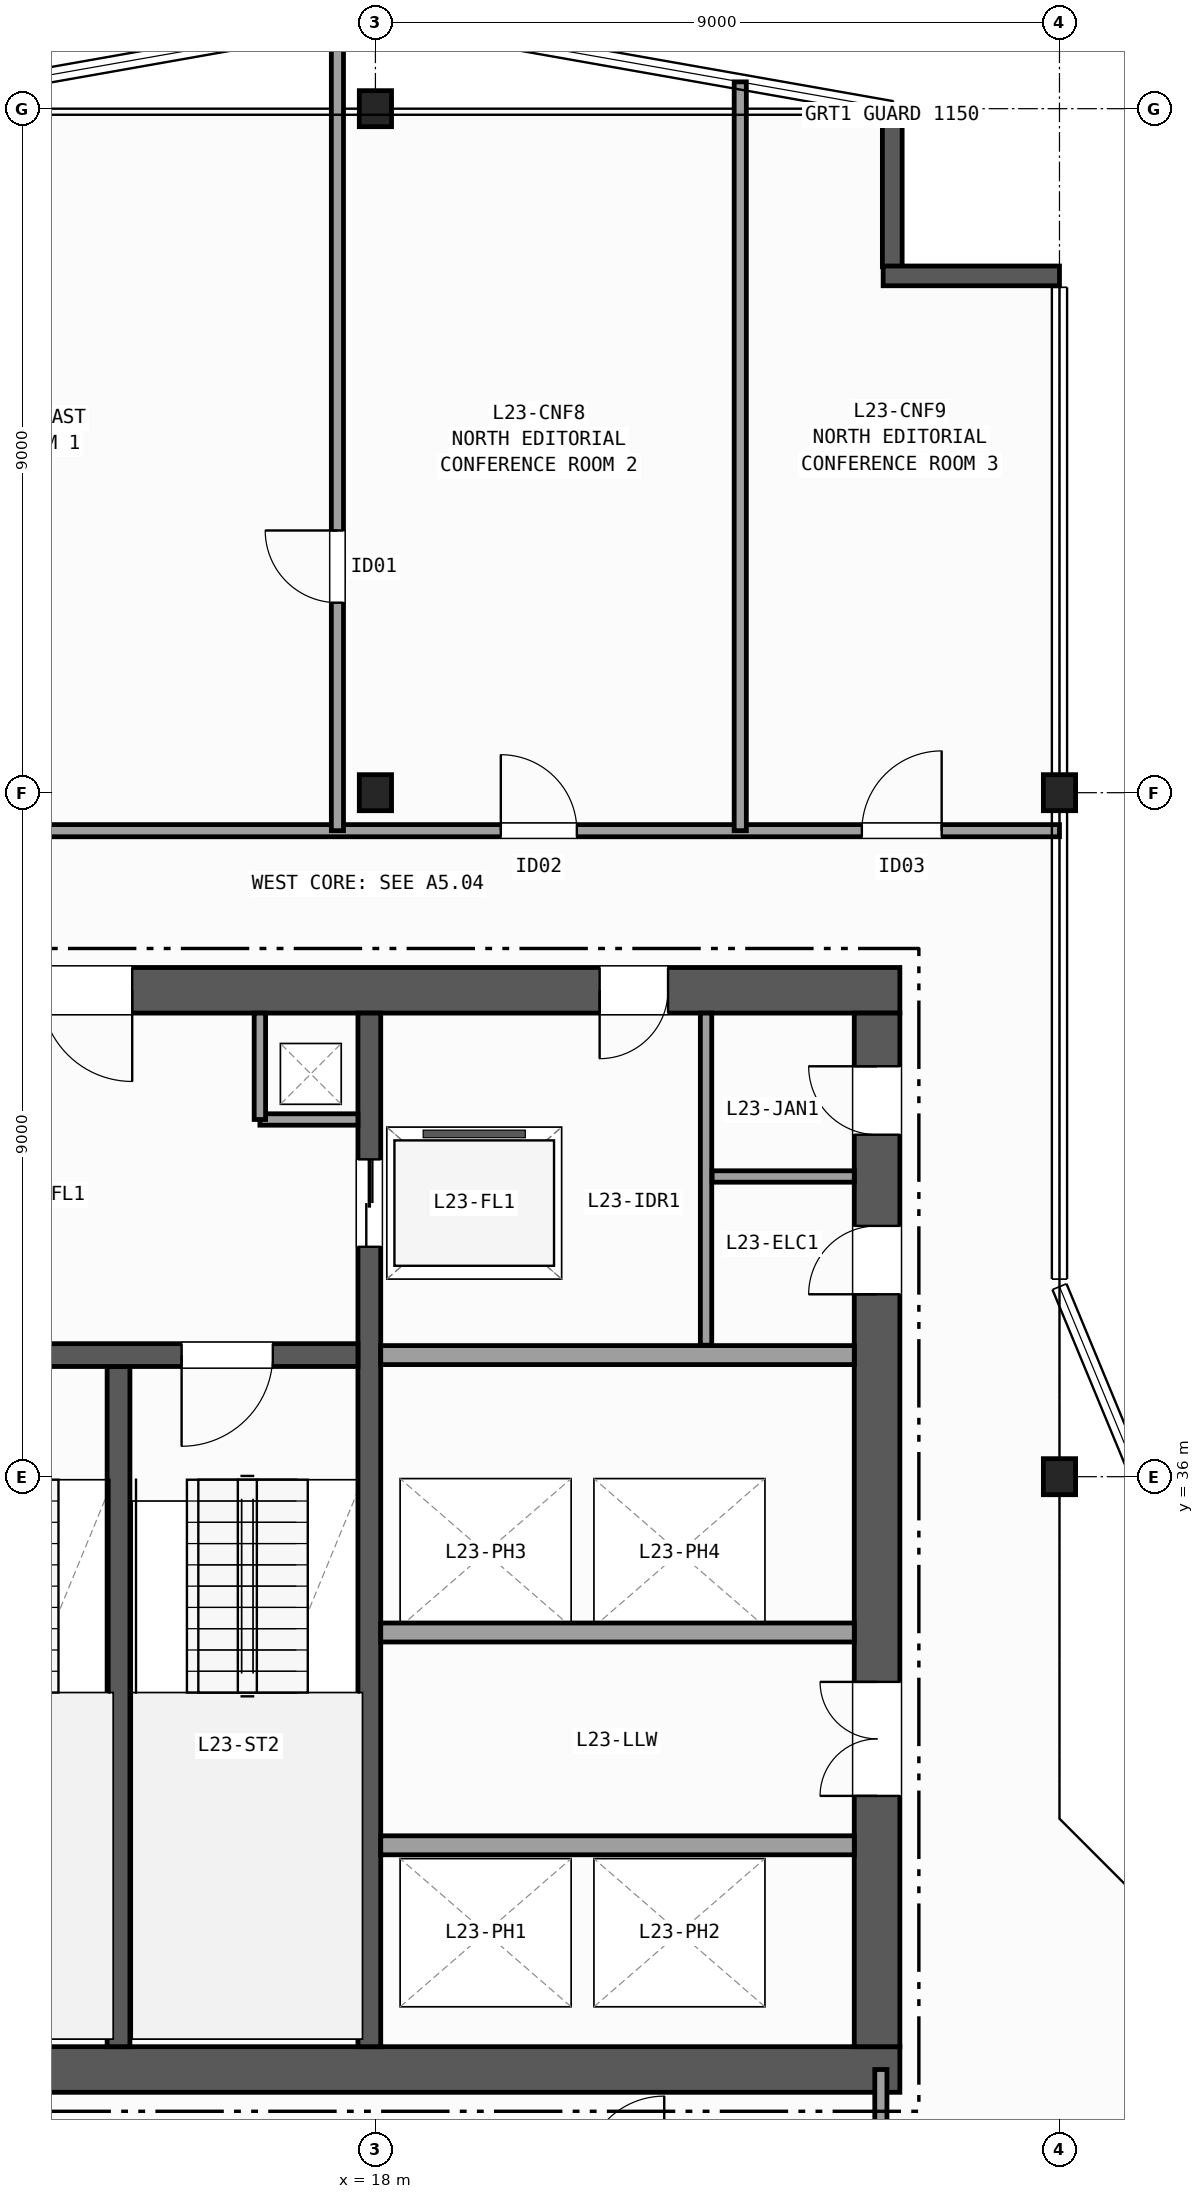
"""IFC4 building model, lengths in metres.
Left out: names, types, materials, properties, quantities, classifications, styles, units other than length and angle.
Written with IfcOpenShell. Run it as: python <this file> out.ifc"""

import sys

from ifc_helpers import new_model, si_unit, direction, frame, frame_2d, origin, origin_2d, place, context, subcontext, project, spatial, rectangle, i_section, extrude, element, fill, save


model = new_model("IFC4")
c1 = context("Model", 3, precision=1e-05, world=origin(), true_north=direction((0.0, 1.0)))
c2 = subcontext(c1, "Body", "Model", "MODEL_VIEW")
j1 = project(units=[si_unit("LENGTHUNIT", "METRE"), si_unit("PLANEANGLEUNIT", "RADIAN")], contexts=[c1])
p1 = place(None, origin())
s1 = spatial("IfcSite", under=j1, at=p1, CompositionType="ELEMENT")
p2 = place(p1, origin())
s2 = spatial("IfcBuilding", under=s1, at=p2, CompositionType="ELEMENT")
p3 = place(p2, frame((0.0, 0.0, 96.5)))
s3 = spatial("IfcBuildingStorey", under=s2, at=p3, CompositionType="ELEMENT", Elevation=96.5)
for number, where, z_axis, x_axis in (
    (1, (18.0, 45.0, 0.0), (0.0, 0.0, 1.0), (1.0, 0.0, 0.0)),
    (2, (18.0, 54.0, 0.0), (0.0, 0.0, 1.0), (1.0, 0.0, 0.0)),
    (3, (27.0, 36.0, 0.0), (0.0, 0.0, 1.0), (1.0, 0.0, 0.0)),
    (4, (27.0, 45.0, 0.0), (0.0, 0.0, 1.0), (1.0, 0.0, 0.0)),
):
    element("IfcColumn", number, at=place(p3, frame(where, z_axis=z_axis, x_axis=x_axis)), inside=s3, PredefinedType="COLUMN", context=c2, shape_type="SweptSolid", body=[
        extrude(i_section(OverallWidth=0.424, OverallDepth=0.474, WebThickness=0.048, FlangeThickness=0.077, FilletRadius=0.015, at=origin_2d()), origin(), (0.0, 0.0, 1.0), 3.7),
    ])
p4 = place(p3, frame((24.8, 54.0, 0.0), z_axis=(0.0, 0.0, 1.0), x_axis=(0.0, -1.0, 0.0)))
e5 = element("IfcWall", 5, at=p4, inside=s3, PredefinedType="SOLIDWALL", context=c2, shape_type="SweptSolid", body=[
    extrude(rectangle(XDim=2.08, YDim=0.26, at=frame_2d((1.04, 0.0))), origin(), (0.0, 0.0, 1.0), 3.37),
])
p5 = place(p3, frame((24.68, 51.8, 0.0), z_axis=(0.0, 0.0, 1.0), x_axis=(1.0, 0.0, 0.0)))
e6 = element("IfcWall", 6, at=p5, inside=s3, PredefinedType="SOLIDWALL", context=c2, shape_type="SweptSolid", body=[
    extrude(rectangle(XDim=2.32, YDim=0.26, at=frame_2d((1.16, 0.0))), origin(), (0.0, 0.0, 1.0), 3.37),
])
p6 = place(p3, frame((10.9, 28.2, 0.0), z_axis=(0.0, 0.0, 1.0), x_axis=(1.0, 0.0, 0.0)))
e7 = element("IfcWall", 7, at=p6, inside=s3, PredefinedType="SHEAR", context=c2, shape_type="SweptSolid", body=[
    extrude(rectangle(XDim=14.0, YDim=0.6, at=frame_2d((7.0, 0.0))), origin(), (0.0, 0.0, 1.0), 3.37),
])
p7 = place(p3, frame((24.9, 42.4, 0.0), z_axis=(0.0, 0.0, 1.0), x_axis=(-1.0, 0.0, 0.0)))
e8 = element("IfcWall", 8, at=p7, inside=s3, PredefinedType="SHEAR", context=c2, shape_type="SweptSolid", body=[
    extrude(rectangle(XDim=14.0, YDim=0.6, at=frame_2d((7.0, 0.0))), origin(), (0.0, 0.0, 1.0), 3.37),
])
p8 = place(p7, frame((10.1, 0.0, 0.0)))
e9 = element("IfcOpeningElement", 9, at=p8, cuts=e8, PredefinedType="OPENING", context=c2, shape_type="SweptSolid", body=[
    extrude(rectangle(XDim=1.2, YDim=2.15, at=frame_2d((0.6, 1.075))), frame((0.0, 0.31, 0.0), z_axis=(0.0, -1.0, 0.0), x_axis=(1.0, 0.0, 0.0)), (0.0, 0.0, 1.0), 0.62),
])
p9 = place(p7, frame((3.05, 0.0, 0.0)))
e10 = element("IfcOpeningElement", 10, at=p9, cuts=e8, PredefinedType="OPENING", context=c2, shape_type="SweptSolid", body=[
    extrude(rectangle(XDim=0.9, YDim=2.1, at=frame_2d((0.45, 1.05))), frame((0.0, 0.31, 0.0), z_axis=(0.0, -1.0, 0.0), x_axis=(1.0, 0.0, 0.0)), (0.0, 0.0, 1.0), 0.62),
])
p10 = place(p3, frame((24.6, 28.5, 0.0), z_axis=(0.0, 0.0, 1.0), x_axis=(0.0, 1.0, 0.0)))
e11 = element("IfcWall", 11, at=p10, inside=s3, PredefinedType="SHEAR", context=c2, shape_type="SweptSolid", body=[
    extrude(rectangle(XDim=13.6, YDim=0.6, at=frame_2d((6.8, 0.0))), origin(), (0.0, 0.0, 1.0), 3.37),
])
p11 = place(p10, frame((3.3, 0.0, 0.0)))
e12 = element("IfcOpeningElement", 12, at=p11, cuts=e11, PredefinedType="OPENING", context=c2, shape_type="SweptSolid", body=[
    extrude(rectangle(XDim=1.5, YDim=2.2, at=frame_2d((0.75, 1.1))), frame((0.0, 0.31, 0.0), z_axis=(0.0, -1.0, 0.0), x_axis=(1.0, 0.0, 0.0)), (0.0, 0.0, 1.0), 0.62),
])
p12 = place(p10, frame((9.9, 0.0, 0.0)))
e13 = element("IfcOpeningElement", 13, at=p12, cuts=e11, PredefinedType="OPENING", context=c2, shape_type="SweptSolid", body=[
    extrude(rectangle(XDim=0.9, YDim=2.1, at=frame_2d((0.45, 1.05))), frame((0.0, 0.31, 0.0), z_axis=(0.0, -1.0, 0.0), x_axis=(1.0, 0.0, 0.0)), (0.0, 0.0, 1.0), 0.62),
])
p13 = place(p10, frame((12.0, 0.0, 0.0)))
e14 = element("IfcOpeningElement", 14, at=p13, cuts=e11, PredefinedType="OPENING", context=c2, shape_type="SweptSolid", body=[
    extrude(rectangle(XDim=0.9, YDim=2.1, at=frame_2d((0.45, 1.05))), frame((0.0, 0.31, 0.0), z_axis=(0.0, -1.0, 0.0), x_axis=(1.0, 0.0, 0.0)), (0.0, 0.0, 1.0), 0.62),
])
p14 = place(p3, frame((14.62, 28.5, 0.0), z_axis=(0.0, 0.0, 1.0), x_axis=(0.0, 1.0, 0.0)))
e15 = element("IfcWall", 15, at=p14, inside=s3, PredefinedType="SHEAR", context=c2, shape_type="SweptSolid", body=[
    extrude(rectangle(XDim=8.95, YDim=0.3, at=frame_2d((4.475, 0.0))), origin(), (0.0, 0.0, 1.0), 3.37),
])
p15 = place(p3, frame((17.92, 42.1, 0.0), z_axis=(0.0, 0.0, 1.0), x_axis=(0.0, -1.0, 0.0)))
e16 = element("IfcWall", 16, at=p15, inside=s3, PredefinedType="SHEAR", context=c2, shape_type="SweptSolid", body=[
    extrude(rectangle(XDim=13.6, YDim=0.3, at=frame_2d((6.8, 0.0))), origin(), (0.0, 0.0, 1.0), 3.37),
])
p16 = place(p15, frame((1.925, 0.0, 0.0)))
e17 = element("IfcOpeningElement", 17, at=p16, cuts=e16, PredefinedType="OPENING", context=c2, shape_type="SweptSolid", body=[
    extrude(rectangle(XDim=1.15, YDim=2.15, at=frame_2d((0.575, 1.075))), frame((0.0, 0.16, 0.0), z_axis=(0.0, -1.0, 0.0), x_axis=(1.0, 0.0, 0.0)), (0.0, 0.0, 1.0), 0.32),
])
p17 = place(p3, frame((17.77, 37.6, 0.0), z_axis=(0.0, 0.0, 1.0), x_axis=(-1.0, 0.0, 0.0)))
e18 = element("IfcWall", 18, at=p17, inside=s3, PredefinedType="SHEAR", context=c2, shape_type="SweptSolid", body=[
    extrude(rectangle(XDim=6.27, YDim=0.3, at=frame_2d((3.135, 0.0))), origin(), (0.0, 0.0, 1.0), 3.37),
])
p18 = place(p17, frame((4.22, 0.0, 0.0)))
e19 = element("IfcOpeningElement", 19, at=p18, cuts=e18, PredefinedType="OPENING", context=c2, shape_type="SweptSolid", body=[
    extrude(rectangle(XDim=1.2, YDim=2.15, at=frame_2d((0.6, 1.075))), frame((0.0, 0.16, 0.0), z_axis=(0.0, -1.0, 0.0), x_axis=(1.0, 0.0, 0.0)), (0.0, 0.0, 1.0), 0.32),
])
p19 = place(p17, frame((1.12, 0.0, 0.0)))
e20 = element("IfcOpeningElement", 20, at=p19, cuts=e18, PredefinedType="OPENING", context=c2, shape_type="SweptSolid", body=[
    extrude(rectangle(XDim=1.2, YDim=2.15, at=frame_2d((0.6, 1.075))), frame((0.0, 0.16, 0.0), z_axis=(0.0, -1.0, 0.0), x_axis=(1.0, 0.0, 0.0)), (0.0, 0.0, 1.0), 0.32),
])
p20 = place(p3, frame((16.48, 40.7, 0.0), z_axis=(0.0, 0.0, 1.0), x_axis=(1.0, 0.0, 0.0)))
e21 = element("IfcWall", 21, at=p20, inside=s3, PredefinedType="PARTITIONING", context=c2, shape_type="SweptSolid", body=[
    extrude(rectangle(XDim=1.29, YDim=0.15, at=frame_2d((0.645, 0.0))), origin(), (0.0, 0.0, 1.0), 3.37),
])
p21 = place(p3, frame((16.48, 40.7, 0.0), z_axis=(0.0, 0.0, 1.0), x_axis=(0.0, 1.0, 0.0)))
e22 = element("IfcWall", 22, at=p21, inside=s3, PredefinedType="PARTITIONING", context=c2, shape_type="SweptSolid", body=[
    extrude(rectangle(XDim=1.4, YDim=0.15, at=frame_2d((0.7, 0.0))), origin(), (0.0, 0.0, 1.0), 3.37),
])
for number, where, z_axis, x_axis in (
    (23, (18.07, 37.6, 0.0), (0.0, 0.0, 1.0), (1.0, 0.0, 0.0)),
    (24, (18.07, 31.15, 0.0), (0.0, 0.0, 1.0), (1.0, 0.0, 0.0)),
    (25, (24.3, 33.95, 0.0), (0.0, 0.0, 1.0), (-1.0, 0.0, 0.0)),
):
    element("IfcWall", number, at=place(p3, frame(where, z_axis=z_axis, x_axis=x_axis)), inside=s3, PredefinedType="PARTITIONING", context=c2, shape_type="SweptSolid", body=[
        extrude(rectangle(XDim=6.23, YDim=0.25, at=frame_2d((3.115, 0.0))), origin(), (0.0, 0.0, 1.0), 3.37),
    ])
p22 = place(p3, frame((22.35, 37.73, 0.0), z_axis=(0.0, 0.0, 1.0), x_axis=(0.0, 1.0, 0.0)))
e26 = element("IfcWall", 26, at=p22, inside=s3, PredefinedType="PARTITIONING", context=c2, shape_type="SweptSolid", body=[
    extrude(rectangle(XDim=4.37, YDim=0.15, at=frame_2d((2.185, 0.0))), origin(), (0.0, 0.0, 1.0), 3.37),
])
p23 = place(p3, frame((22.43, 39.95, 0.0), z_axis=(0.0, 0.0, 1.0), x_axis=(1.0, 0.0, 0.0)))
e27 = element("IfcWall", 27, at=p23, inside=s3, PredefinedType="PARTITIONING", context=c2, shape_type="SweptSolid", body=[
    extrude(rectangle(XDim=1.87, YDim=0.15, at=frame_2d((0.935, 0.0))), origin(), (0.0, 0.0, 1.0), 3.37),
])
p24 = place(p3, frame((24.65, 9.0, 0.0), z_axis=(0.0, 0.0, 1.0), x_axis=(0.0, 1.0, 0.0)))
e28 = element("IfcWall", 28, at=p24, inside=s3, PredefinedType="PARTITIONING", context=c2, shape_type="SweptSolid", body=[
    extrude(rectangle(XDim=19.2, YDim=0.16, at=frame_2d((9.6, 0.0))), origin(), (0.0, 0.0, 1.0), 2.577),
])
p25 = place(p24, frame((3.2, 0.0, 0.0)))
e29 = element("IfcOpeningElement", 29, at=p25, cuts=e28, PredefinedType="OPENING", context=c2, shape_type="SweptSolid", body=[
    extrude(rectangle(XDim=1.2, YDim=2.15, at=frame_2d((0.6, 1.075))), frame((0.0, 0.09, 0.0), z_axis=(0.0, -1.0, 0.0), x_axis=(1.0, 0.0, 0.0)), (0.0, 0.0, 1.0), 0.18),
])
p26 = place(p24, frame((10.99, 0.0, 0.0)))
e30 = element("IfcOpeningElement", 30, at=p26, cuts=e28, PredefinedType="OPENING", context=c2, shape_type="SweptSolid", body=[
    extrude(rectangle(XDim=0.86, YDim=2.05, at=frame_2d((0.43, 1.025))), frame((0.0, 0.09, 0.0), z_axis=(0.0, -1.0, 0.0), x_axis=(1.0, 0.0, 0.0)), (0.0, 0.0, 1.0), 0.18),
])
p27 = place(p3, frame((9.0, 44.5, 0.0), z_axis=(0.0, 0.0, 1.0), x_axis=(1.0, 0.0, 0.0)))
e31 = element("IfcWall", 31, at=p27, inside=s3, PredefinedType="PARTITIONING", context=c2, shape_type="SweptSolid", body=[
    extrude(rectangle(XDim=18.0, YDim=0.16, at=frame_2d((9.0, 0.0))), origin(), (0.0, 0.0, 1.0), 2.577),
])
p28 = place(p27, frame((10.65, 0.0, 0.0)))
e32 = element("IfcOpeningElement", 32, at=p28, cuts=e31, PredefinedType="OPENING", context=c2, shape_type="SweptSolid", body=[
    extrude(rectangle(XDim=1.0, YDim=2.1, at=frame_2d((0.5, 1.05))), frame((0.0, 0.09, 0.0), z_axis=(0.0, -1.0, 0.0), x_axis=(1.0, 0.0, 0.0)), (0.0, 0.0, 1.0), 0.18),
])
p29 = place(p27, frame((15.4, 0.0, 0.0)))
e33 = element("IfcOpeningElement", 33, at=p29, cuts=e31, PredefinedType="OPENING", context=c2, shape_type="SweptSolid", body=[
    extrude(rectangle(XDim=1.05, YDim=2.15, at=frame_2d((0.525, 1.075))), frame((0.0, 0.09, 0.0), z_axis=(0.0, -1.0, 0.0), x_axis=(1.0, 0.0, 0.0)), (0.0, 0.0, 1.0), 0.18),
])
p30 = place(p3, frame((17.5, 44.5, 0.0), z_axis=(0.0, 0.0, 1.0), x_axis=(0.0, 1.0, 0.0)))
e34 = element("IfcWall", 34, at=p30, inside=s3, PredefinedType="PARTITIONING", context=c2, shape_type="SweptSolid", body=[
    extrude(rectangle(XDim=10.612, YDim=0.16, at=frame_2d((5.306, 0.0))), origin(), (0.0, 0.0, 1.0), 3.37),
])
p31 = place(p30, frame((3.0, 0.0, 0.0)))
e35 = element("IfcOpeningElement", 35, at=p31, cuts=e34, PredefinedType="OPENING", context=c2, shape_type="SweptSolid", body=[
    extrude(rectangle(XDim=0.95, YDim=2.1, at=frame_2d((0.475, 1.05))), frame((0.0, 0.09, 0.0), z_axis=(0.0, -1.0, 0.0), x_axis=(1.0, 0.0, 0.0)), (0.0, 0.0, 1.0), 0.18),
])
p32 = place(p3, frame((22.8, 44.5, 0.0), z_axis=(0.0, 0.0, 1.0), x_axis=(0.0, 1.0, 0.0)))
e36 = element("IfcWall", 36, at=p32, inside=s3, PredefinedType="PARTITIONING", context=c2, shape_type="SweptSolid", body=[
    extrude(rectangle(XDim=9.853, YDim=0.16, at=frame_2d((4.927, 0.0))), origin(), (0.0, 0.0, 1.0), 3.37),
])
p33 = place(p19, origin())
e37 = element("IfcDoor", 37, at=p33, inside=s3, OperationType="SINGLE_SWING_RIGHT", PredefinedType="DOOR", context=c2, shape_type="SweptSolid", body=[
    extrude(rectangle(XDim=1.2, YDim=2.15, at=frame_2d((0.6, 1.075))), frame((0.0, 0.025, 0.0), z_axis=(0.0, -1.0, 0.0), x_axis=(1.0, 0.0, 0.0)), (0.0, 0.0, 1.0), 0.05),
])
fill(e20, e37)
p34 = place(p11, origin())
e38 = element("IfcDoor", 38, at=p34, inside=s3, OperationType="DOUBLE_DOOR_SINGLE_SWING", PredefinedType="DOOR", context=c2, shape_type="SweptSolid", body=[
    extrude(rectangle(XDim=1.5, YDim=2.2, at=frame_2d((0.75, 1.1))), frame((0.0, 0.025, 0.0), z_axis=(0.0, -1.0, 0.0), x_axis=(1.0, 0.0, 0.0)), (0.0, 0.0, 1.0), 0.05),
])
fill(e12, e38)
p35 = place(p8, origin())
e39 = element("IfcDoor", 39, at=p35, inside=s3, OperationType="SINGLE_SWING_LEFT", PredefinedType="DOOR", context=c2, shape_type="SweptSolid", body=[
    extrude(rectangle(XDim=1.2, YDim=2.15, at=frame_2d((0.6, 1.075))), frame((0.0, 0.025, 0.0), z_axis=(0.0, -1.0, 0.0), x_axis=(1.0, 0.0, 0.0)), (0.0, 0.0, 1.0), 0.05),
])
fill(e9, e39)
p36 = place(p12, origin())
e40 = element("IfcDoor", 40, at=p36, inside=s3, OperationType="SINGLE_SWING_LEFT", PredefinedType="DOOR", context=c2, shape_type="SweptSolid", body=[
    extrude(rectangle(XDim=0.9, YDim=2.1, at=frame_2d((0.45, 1.05))), frame((0.0, 0.025, 0.0), z_axis=(0.0, -1.0, 0.0), x_axis=(1.0, 0.0, 0.0)), (0.0, 0.0, 1.0), 0.05),
])
fill(e13, e40)
p37 = place(p9, origin())
e41 = element("IfcDoor", 41, at=p37, inside=s3, OperationType="SINGLE_SWING_RIGHT", PredefinedType="DOOR", context=c2, shape_type="SweptSolid", body=[
    extrude(rectangle(XDim=0.9, YDim=2.1, at=frame_2d((0.45, 1.05))), frame((0.0, 0.025, 0.0), z_axis=(0.0, -1.0, 0.0), x_axis=(1.0, 0.0, 0.0)), (0.0, 0.0, 1.0), 0.05),
])
fill(e10, e41)
p38 = place(p13, origin())
e42 = element("IfcDoor", 42, at=p38, inside=s3, OperationType="SINGLE_SWING_RIGHT", PredefinedType="DOOR", context=c2, shape_type="SweptSolid", body=[
    extrude(rectangle(XDim=0.9, YDim=2.1, at=frame_2d((0.45, 1.05))), frame((0.0, 0.025, 0.0), z_axis=(0.0, -1.0, 0.0), x_axis=(1.0, 0.0, 0.0)), (0.0, 0.0, 1.0), 0.05),
])
fill(e14, e42)
p39 = place(p16, origin())
e43 = element("IfcDoor", 43, at=p39, inside=s3, OperationType="DOUBLE_DOOR_SLIDING", PredefinedType="DOOR", context=c2, shape_type="SweptSolid", body=[
    extrude(rectangle(XDim=1.15, YDim=2.15, at=frame_2d((0.575, 1.075))), frame((0.0, 0.025, 0.0), z_axis=(0.0, -1.0, 0.0), x_axis=(1.0, 0.0, 0.0)), (0.0, 0.0, 1.0), 0.05),
])
fill(e17, e43)
p40 = place(p31, origin())
e44 = element("IfcDoor", 44, at=p40, inside=s3, OperationType="SINGLE_SWING_RIGHT", PredefinedType="DOOR", context=c2, shape_type="SweptSolid", body=[
    extrude(rectangle(XDim=0.95, YDim=2.1, at=frame_2d((0.475, 1.05))), frame((0.0, 0.025, 0.0), z_axis=(0.0, -1.0, 0.0), x_axis=(1.0, 0.0, 0.0)), (0.0, 0.0, 1.0), 0.05),
])
fill(e35, e44)
p41 = place(p28, origin())
e45 = element("IfcDoor", 45, at=p41, inside=s3, OperationType="SINGLE_SWING_LEFT", PredefinedType="DOOR", context=c2, shape_type="SweptSolid", body=[
    extrude(rectangle(XDim=1.0, YDim=2.1, at=frame_2d((0.5, 1.05))), frame((0.0, 0.025, 0.0), z_axis=(0.0, -1.0, 0.0), x_axis=(1.0, 0.0, 0.0)), (0.0, 0.0, 1.0), 0.05),
])
fill(e32, e45)
p42 = place(p29, origin())
e46 = element("IfcDoor", 46, at=p42, inside=s3, OperationType="SINGLE_SWING_RIGHT", PredefinedType="DOOR", context=c2, shape_type="SweptSolid", body=[
    extrude(rectangle(XDim=1.05, YDim=2.15, at=frame_2d((0.525, 1.075))), frame((0.0, 0.025, 0.0), z_axis=(0.0, -1.0, 0.0), x_axis=(1.0, 0.0, 0.0)), (0.0, 0.0, 1.0), 0.05),
])
fill(e33, e46)
save(model, sys.argv[1])
